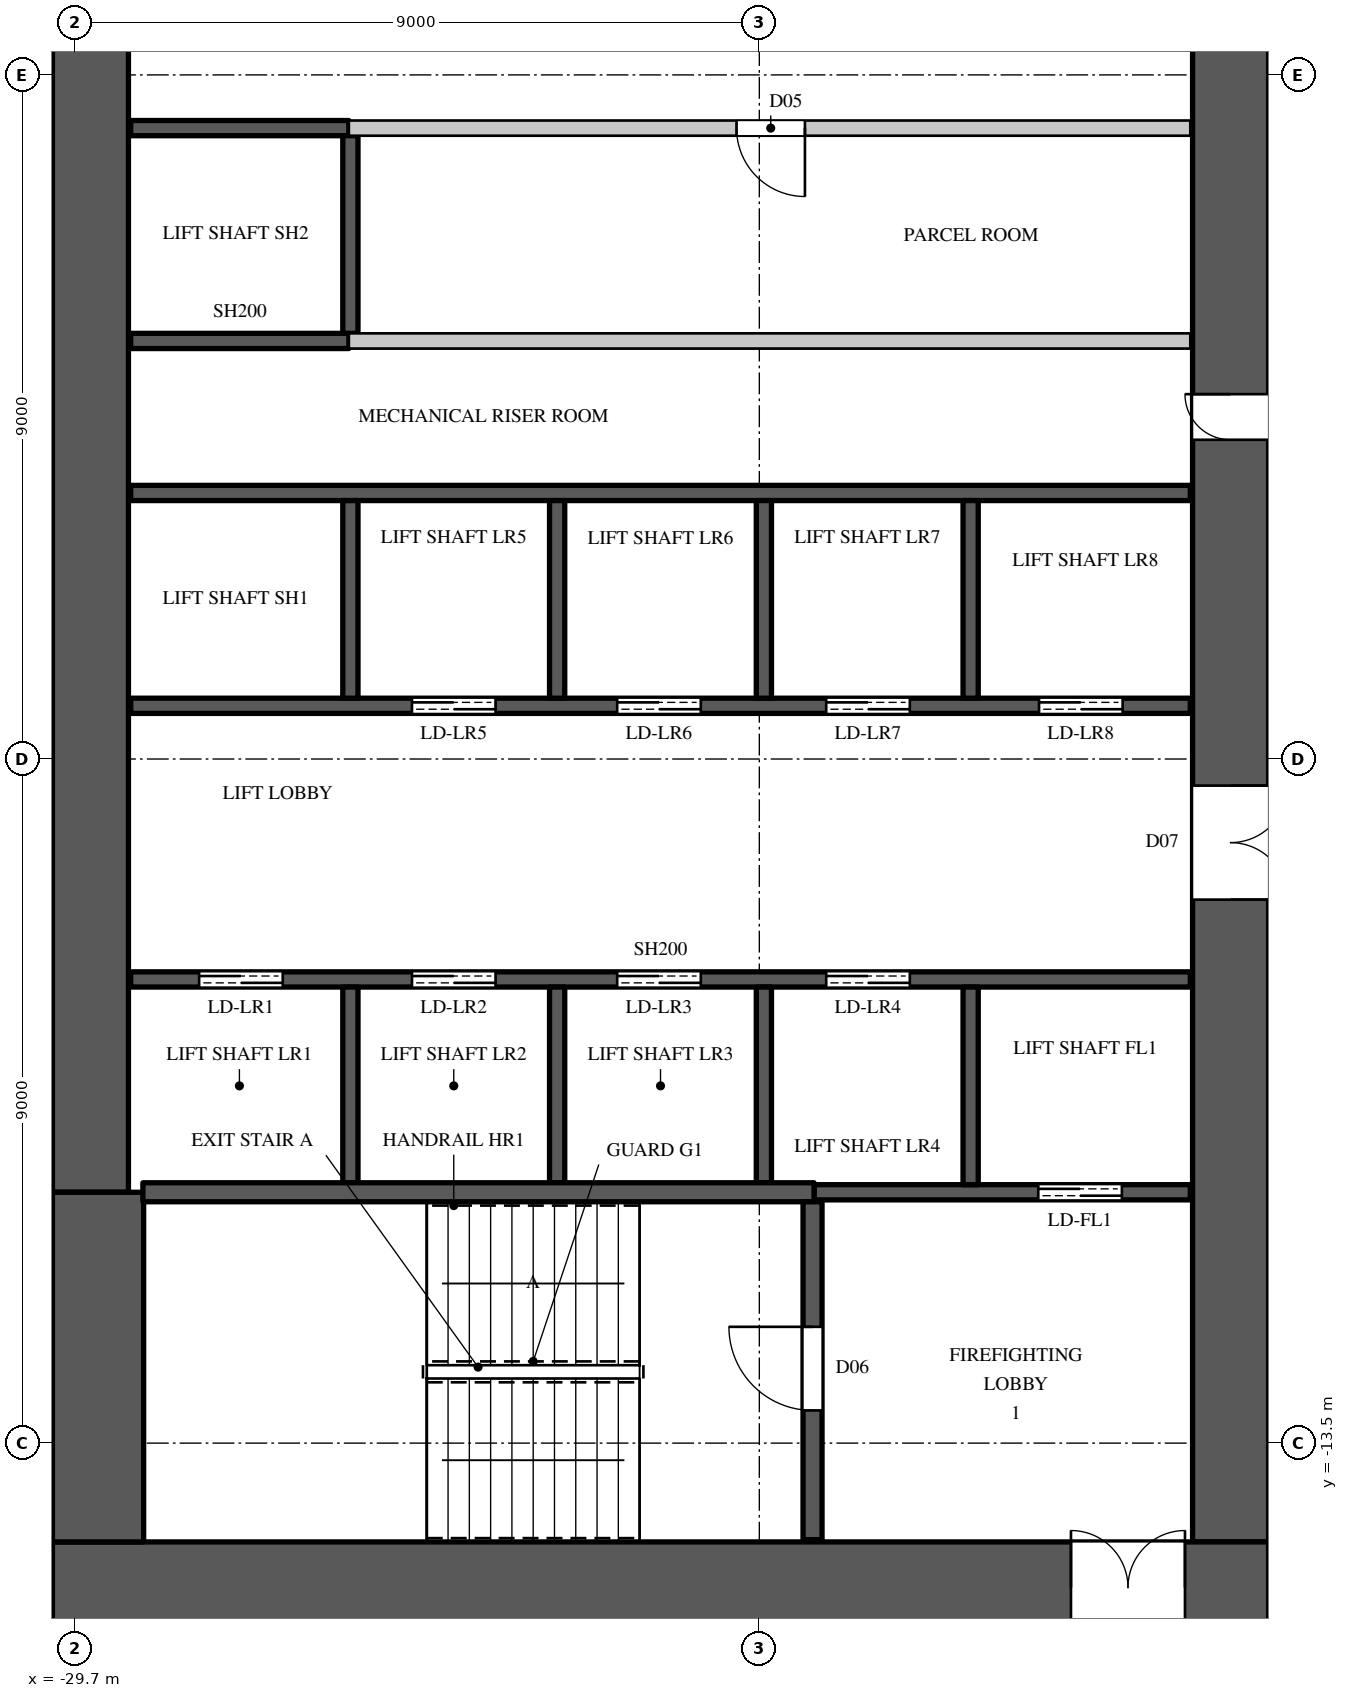
"""IFC4 building model, lengths in metres.
Left out: names, types, materials, properties, quantities, classifications, styles, units other than length and angle.
Written with IfcOpenShell. Run it as: python <this file> out.ifc"""

import sys

from ifc_helpers import new_model, si_unit, direction, frame, frame_2d, origin, place, context, subcontext, project, spatial, rectangle, extrude, element, fill, save


model = new_model("IFC4")
c1 = context("Model", 3, precision=1e-05, world=origin(), true_north=direction((0.0, 1.0)))
c2 = subcontext(c1, "Body", "Model", "MODEL_VIEW")
j1 = project(units=[si_unit("LENGTHUNIT", "METRE"), si_unit("PLANEANGLEUNIT", "RADIAN")], contexts=[c1])
p1 = place(None, origin())
s1 = spatial("IfcSite", under=j1, at=p1, CompositionType="ELEMENT")
p2 = place(p1, origin())
s2 = spatial("IfcBuilding", under=s1, at=p2, CompositionType="ELEMENT")
p3 = place(p2, frame((0.0, 0.0, 109.5)))
s3 = spatial("IfcBuildingStorey", under=s2, at=p3, CompositionType="ELEMENT", Elevation=109.5)
p4 = place(p3, frame((-30.0, -15.4, 0.0), z_axis=(0.0, 0.0, 1.0), x_axis=(1.0, 0.0, 0.0)))
e1 = element("IfcWall", 1, at=p4, inside=s3, PredefinedType="SHEAR", context=c2, shape_type="SweptSolid", body=[
    extrude(rectangle(XDim=16.0, YDim=1.2, at=frame_2d((8.0, 0.0))), origin(), (0.0, 0.0, 1.0), 3.6),
])
p5 = place(p4, frame((13.4, 0.0, 0.0)))
e2 = element("IfcOpeningElement", 2, at=p5, cuts=e1, PredefinedType="OPENING", context=c2, shape_type="SweptSolid", body=[
    extrude(rectangle(XDim=1.5, YDim=2.4, at=frame_2d((0.75, 1.2))), frame((0.0, 0.61, 0.0), z_axis=(0.0, -1.0, 0.0), x_axis=(1.0, 0.0, 0.0)), (0.0, 0.0, 1.0), 1.22),
])
p6 = place(p3, frame((-14.5, -14.8, 0.0), z_axis=(0.0, 0.0, 1.0), x_axis=(0.0, 1.0, 0.0)))
e3 = element("IfcWall", 3, at=p6, inside=s3, PredefinedType="SHEAR", context=c2, shape_type="SweptSolid", body=[
    extrude(rectangle(XDim=29.6, YDim=1.0, at=frame_2d((14.8, 0.0))), origin(), (0.0, 0.0, 1.0), 3.6),
])
p7 = place(p6, frame((8.45, 0.0, 0.0)))
e4 = element("IfcOpeningElement", 4, at=p7, cuts=e3, PredefinedType="OPENING", context=c2, shape_type="SweptSolid", body=[
    extrude(rectangle(XDim=1.5, YDim=2.4, at=frame_2d((0.75, 1.2))), frame((0.0, 0.51, 0.0), z_axis=(0.0, -1.0, 0.0), x_axis=(1.0, 0.0, 0.0)), (0.0, 0.0, 1.0), 1.02),
])
p8 = place(p6, frame((19.65, 0.0, 0.0)))
e5 = element("IfcOpeningElement", 5, at=p8, cuts=e3, PredefinedType="OPENING", context=c2, shape_type="SweptSolid", body=[
    extrude(rectangle(XDim=1.5, YDim=2.4, at=frame_2d((0.75, 1.2))), frame((0.0, 0.51, 0.0), z_axis=(0.0, -1.0, 0.0), x_axis=(1.0, 0.0, 0.0)), (0.0, 0.0, 1.0), 1.02),
])
p9 = place(p6, frame((14.5, 0.0, 0.0)))
e6 = element("IfcOpeningElement", 6, at=p9, cuts=e3, PredefinedType="OPENING", context=c2, shape_type="SweptSolid", body=[
    extrude(rectangle(XDim=0.6, YDim=2.0, at=frame_2d((0.3, 1.0))), frame((0.0, 0.51, 0.0), z_axis=(0.0, -1.0, 0.0), x_axis=(1.0, 0.0, 0.0)), (0.0, 0.0, 1.0), 1.02),
])
p10 = place(p3, frame((-29.5, -10.2, 0.0), z_axis=(0.0, 0.0, 1.0), x_axis=(0.0, 1.0, 0.0)))
e7 = element("IfcWall", 7, at=p10, inside=s3, PredefinedType="SHEAR", context=c2, shape_type="SweptSolid", body=[
    extrude(rectangle(XDim=20.4, YDim=1.0, at=frame_2d((10.2, 0.0))), origin(), (0.0, 0.0, 1.0), 3.6),
])
p11 = place(p3, frame((-29.4, -14.8, 0.0), z_axis=(0.0, 0.0, 1.0), x_axis=(0.0, 1.0, 0.0)))
e8 = element("IfcWall", 8, at=p11, inside=s3, PredefinedType="SHEAR", context=c2, shape_type="SweptSolid", body=[
    extrude(rectangle(XDim=4.6, YDim=1.2, at=frame_2d((2.3, 0.0))), origin(), (0.0, 0.0, 1.0), 3.6),
])
p12 = place(p3, frame((-26.1, 3.8, 0.0), z_axis=(0.0, 0.0, 1.0), x_axis=(1.0, 0.0, 0.0)))
e9 = element("IfcWall", 9, at=p12, inside=s3, PredefinedType="PARTITIONING", context=c2, shape_type="SweptSolid", body=[
    extrude(rectangle(XDim=11.07, YDim=0.2, at=frame_2d((5.535, 0.0))), origin(), (0.0, 0.0, 1.0), 3.3),
])
p13 = place(p12, frame((5.1, 0.0, 0.0)))
e10 = element("IfcOpeningElement", 10, at=p13, cuts=e9, PredefinedType="OPENING", context=c2, shape_type="SweptSolid", body=[
    extrude(rectangle(XDim=0.9, YDim=2.2, at=frame_2d((0.45, 1.1))), frame((0.0, 0.11, 0.0), z_axis=(0.0, -1.0, 0.0), x_axis=(1.0, 0.0, 0.0)), (0.0, 0.0, 1.0), 0.22),
])
p14 = place(p3, frame((-26.1, 1.0, 0.0), z_axis=(0.0, 0.0, 1.0), x_axis=(1.0, 0.0, 0.0)))
e11 = element("IfcWall", 11, at=p14, inside=s3, PredefinedType="PARTITIONING", context=c2, shape_type="SweptSolid", body=[
    extrude(rectangle(XDim=11.07, YDim=0.2, at=frame_2d((5.535, 0.0))), origin(), (0.0, 0.0, 1.0), 3.3),
])
p15 = place(p3, frame((-28.97, -7.4, 0.0), z_axis=(0.0, 0.0, 1.0), x_axis=(1.0, 0.0, 0.0)))
e12 = element("IfcWall", 12, at=p15, inside=s3, PredefinedType="SHEAR", context=c2, shape_type="SweptSolid", body=[
    extrude(rectangle(XDim=13.94, YDim=0.2, at=frame_2d((6.97, 0.0))), origin(), (0.0, 0.0, 1.0), 3.3),
])
p16 = place(p15, frame((0.9, 0.0, 0.0)))
e13 = element("IfcOpeningElement", 13, at=p16, cuts=e12, PredefinedType="OPENING", context=c2, shape_type="SweptSolid", body=[
    extrude(rectangle(XDim=1.1, YDim=2.2, at=frame_2d((0.55, 1.1))), frame((0.0, 0.11, 0.0), z_axis=(0.0, -1.0, 0.0), x_axis=(1.0, 0.0, 0.0)), (0.0, 0.0, 1.0), 0.22),
])
p17 = place(p15, frame((3.7, 0.0, 0.0)))
e14 = element("IfcOpeningElement", 14, at=p17, cuts=e12, PredefinedType="OPENING", context=c2, shape_type="SweptSolid", body=[
    extrude(rectangle(XDim=1.1, YDim=2.2, at=frame_2d((0.55, 1.1))), frame((0.0, 0.11, 0.0), z_axis=(0.0, -1.0, 0.0), x_axis=(1.0, 0.0, 0.0)), (0.0, 0.0, 1.0), 0.22),
])
p18 = place(p15, frame((6.4, 0.0, 0.0)))
e15 = element("IfcOpeningElement", 15, at=p18, cuts=e12, PredefinedType="OPENING", context=c2, shape_type="SweptSolid", body=[
    extrude(rectangle(XDim=1.1, YDim=2.2, at=frame_2d((0.55, 1.1))), frame((0.0, 0.11, 0.0), z_axis=(0.0, -1.0, 0.0), x_axis=(1.0, 0.0, 0.0)), (0.0, 0.0, 1.0), 0.22),
])
p19 = place(p15, frame((9.15, 0.0, 0.0)))
e16 = element("IfcOpeningElement", 16, at=p19, cuts=e12, PredefinedType="OPENING", context=c2, shape_type="SweptSolid", body=[
    extrude(rectangle(XDim=1.1, YDim=2.2, at=frame_2d((0.55, 1.1))), frame((0.0, 0.11, 0.0), z_axis=(0.0, -1.0, 0.0), x_axis=(1.0, 0.0, 0.0)), (0.0, 0.0, 1.0), 0.22),
])
p20 = place(p3, frame((-28.97, -3.8, 0.0), z_axis=(0.0, 0.0, 1.0), x_axis=(1.0, 0.0, 0.0)))
e17 = element("IfcWall", 17, at=p20, inside=s3, PredefinedType="SHEAR", context=c2, shape_type="SweptSolid", body=[
    extrude(rectangle(XDim=13.94, YDim=0.2, at=frame_2d((6.97, 0.0))), origin(), (0.0, 0.0, 1.0), 3.3),
])
p21 = place(p20, frame((3.7, 0.0, 0.0)))
e18 = element("IfcOpeningElement", 18, at=p21, cuts=e17, PredefinedType="OPENING", context=c2, shape_type="SweptSolid", body=[
    extrude(rectangle(XDim=1.1, YDim=2.2, at=frame_2d((0.55, 1.1))), frame((0.0, 0.11, 0.0), z_axis=(0.0, -1.0, 0.0), x_axis=(1.0, 0.0, 0.0)), (0.0, 0.0, 1.0), 0.22),
])
p22 = place(p20, frame((6.4, 0.0, 0.0)))
e19 = element("IfcOpeningElement", 19, at=p22, cuts=e17, PredefinedType="OPENING", context=c2, shape_type="SweptSolid", body=[
    extrude(rectangle(XDim=1.1, YDim=2.2, at=frame_2d((0.55, 1.1))), frame((0.0, 0.11, 0.0), z_axis=(0.0, -1.0, 0.0), x_axis=(1.0, 0.0, 0.0)), (0.0, 0.0, 1.0), 0.22),
])
p23 = place(p20, frame((9.15, 0.0, 0.0)))
e20 = element("IfcOpeningElement", 20, at=p23, cuts=e17, PredefinedType="OPENING", context=c2, shape_type="SweptSolid", body=[
    extrude(rectangle(XDim=1.1, YDim=2.2, at=frame_2d((0.55, 1.1))), frame((0.0, 0.11, 0.0), z_axis=(0.0, -1.0, 0.0), x_axis=(1.0, 0.0, 0.0)), (0.0, 0.0, 1.0), 0.22),
])
p24 = place(p20, frame((11.95, 0.0, 0.0)))
e21 = element("IfcOpeningElement", 21, at=p24, cuts=e17, PredefinedType="OPENING", context=c2, shape_type="SweptSolid", body=[
    extrude(rectangle(XDim=1.1, YDim=2.2, at=frame_2d((0.55, 1.1))), frame((0.0, 0.11, 0.0), z_axis=(0.0, -1.0, 0.0), x_axis=(1.0, 0.0, 0.0)), (0.0, 0.0, 1.0), 0.22),
])
p25 = place(p3, frame((-28.97, -1.0, 0.0), z_axis=(0.0, 0.0, 1.0), x_axis=(1.0, 0.0, 0.0)))
e22 = element("IfcWall", 22, at=p25, inside=s3, PredefinedType="SHEAR", context=c2, shape_type="SweptSolid", body=[
    extrude(rectangle(XDim=13.94, YDim=0.2, at=frame_2d((6.97, 0.0))), origin(), (0.0, 0.0, 1.0), 3.3),
])
for number, where, z_axis, x_axis in (
    (23, (-28.97, 1.0, 0.0), (0.0, 0.0, 1.0), (1.0, 0.0, 0.0)),
    (24, (-28.97, 3.8, 0.0), (0.0, 0.0, 1.0), (1.0, 0.0, 0.0)),
):
    element("IfcWall", number, at=place(p3, frame(where, z_axis=z_axis, x_axis=x_axis)), inside=s3, PredefinedType="SHEAR", context=c2, shape_type="SweptSolid", body=[
        extrude(rectangle(XDim=2.87, YDim=0.2, at=frame_2d((1.435, 0.0))), origin(), (0.0, 0.0, 1.0), 3.3),
    ])
p26 = place(p3, frame((-26.08, -10.075, 0.0), z_axis=(0.0, 0.0, 1.0), x_axis=(0.0, 1.0, 0.0)))
e25 = element("IfcWall", 25, at=p26, inside=s3, PredefinedType="SHEAR", context=c2, shape_type="SweptSolid", body=[
    extrude(rectangle(XDim=2.575, YDim=0.2, at=frame_2d((1.288, 0.0))), origin(), (0.0, 0.0, 1.0), 3.6),
])
p27 = place(p3, frame((-26.08, -3.7, 0.0), z_axis=(0.0, 0.0, 1.0), x_axis=(0.0, 1.0, 0.0)))
e26 = element("IfcWall", 26, at=p27, inside=s3, PredefinedType="SHEAR", context=c2, shape_type="SweptSolid", body=[
    extrude(rectangle(XDim=2.6, YDim=0.2, at=frame_2d((1.3, 0.0))), origin(), (0.0, 0.0, 1.0), 3.6),
])
p28 = place(p3, frame((-26.08, 1.1, 0.0), z_axis=(0.0, 0.0, 1.0), x_axis=(0.0, 1.0, 0.0)))
e27 = element("IfcWall", 27, at=p28, inside=s3, PredefinedType="SHEAR", context=c2, shape_type="SweptSolid", body=[
    extrude(rectangle(XDim=2.6, YDim=0.2, at=frame_2d((1.3, 0.0))), origin(), (0.0, 0.0, 1.0), 3.3),
])
p29 = place(p3, frame((-23.36, -10.075, 0.0), z_axis=(0.0, 0.0, 1.0), x_axis=(0.0, 1.0, 0.0)))
e28 = element("IfcWall", 28, at=p29, inside=s3, PredefinedType="SHEAR", context=c2, shape_type="SweptSolid", body=[
    extrude(rectangle(XDim=2.575, YDim=0.2, at=frame_2d((1.288, 0.0))), origin(), (0.0, 0.0, 1.0), 3.6),
])
p30 = place(p3, frame((-23.36, -3.7, 0.0), z_axis=(0.0, 0.0, 1.0), x_axis=(0.0, 1.0, 0.0)))
e29 = element("IfcWall", 29, at=p30, inside=s3, PredefinedType="SHEAR", context=c2, shape_type="SweptSolid", body=[
    extrude(rectangle(XDim=2.6, YDim=0.2, at=frame_2d((1.3, 0.0))), origin(), (0.0, 0.0, 1.0), 3.6),
])
p31 = place(p3, frame((-20.64, -10.075, 0.0), z_axis=(0.0, 0.0, 1.0), x_axis=(0.0, 1.0, 0.0)))
e30 = element("IfcWall", 30, at=p31, inside=s3, PredefinedType="SHEAR", context=c2, shape_type="SweptSolid", body=[
    extrude(rectangle(XDim=2.575, YDim=0.2, at=frame_2d((1.288, 0.0))), origin(), (0.0, 0.0, 1.0), 3.6),
])
p32 = place(p3, frame((-20.64, -3.7, 0.0), z_axis=(0.0, 0.0, 1.0), x_axis=(0.0, 1.0, 0.0)))
e31 = element("IfcWall", 31, at=p32, inside=s3, PredefinedType="SHEAR", context=c2, shape_type="SweptSolid", body=[
    extrude(rectangle(XDim=2.6, YDim=0.2, at=frame_2d((1.3, 0.0))), origin(), (0.0, 0.0, 1.0), 3.6),
])
p33 = place(p3, frame((-19.98, -10.2, 0.0), z_axis=(0.0, 0.0, 1.0), x_axis=(1.0, 0.0, 0.0)))
e32 = element("IfcWall", 32, at=p33, inside=s3, PredefinedType="SHEAR", context=c2, shape_type="SweptSolid", body=[
    extrude(rectangle(XDim=4.95, YDim=0.2, at=frame_2d((2.475, 0.0))), origin(), (0.0, 0.0, 1.0), 3.3),
])
p34 = place(p33, frame((2.95, 0.0, 0.0)))
e33 = element("IfcOpeningElement", 33, at=p34, cuts=e32, PredefinedType="OPENING", context=c2, shape_type="SweptSolid", body=[
    extrude(rectangle(XDim=1.1, YDim=2.2, at=frame_2d((0.55, 1.1))), frame((0.0, 0.11, 0.0), z_axis=(0.0, -1.0, 0.0), x_axis=(1.0, 0.0, 0.0)), (0.0, 0.0, 1.0), 0.22),
])
p35 = place(p3, frame((-17.92, -10.1, 0.0), z_axis=(0.0, 0.0, 1.0), x_axis=(0.0, 1.0, 0.0)))
e34 = element("IfcWall", 34, at=p35, inside=s3, PredefinedType="SHEAR", context=c2, shape_type="SweptSolid", body=[
    extrude(rectangle(XDim=2.6, YDim=0.2, at=frame_2d((1.3, 0.0))), origin(), (0.0, 0.0, 1.0), 3.6),
])
p36 = place(p3, frame((-17.92, -3.7, 0.0), z_axis=(0.0, 0.0, 1.0), x_axis=(0.0, 1.0, 0.0)))
e35 = element("IfcWall", 35, at=p36, inside=s3, PredefinedType="SHEAR", context=c2, shape_type="SweptSolid", body=[
    extrude(rectangle(XDim=2.6, YDim=0.2, at=frame_2d((1.3, 0.0))), origin(), (0.0, 0.0, 1.0), 3.6),
])
p37 = place(p3, frame((-28.81, -10.2, 0.0), z_axis=(0.0, 0.0, 1.0), x_axis=(1.0, 0.0, 0.0)))
e36 = element("IfcWall", 36, at=p37, inside=s3, PredefinedType="SHEAR", context=c2, shape_type="SweptSolid", body=[
    extrude(rectangle(XDim=8.83, YDim=0.25, at=frame_2d((4.415, 0.0))), origin(), (0.0, 0.0, 1.0), 3.3),
])
p38 = place(p3, frame((-20.0, -14.77, 0.0), z_axis=(0.0, 0.0, 1.0), x_axis=(0.0, 1.0, 0.0)))
e37 = element("IfcWall", 37, at=p38, inside=s3, PredefinedType="SHEAR", context=c2, shape_type="SweptSolid", body=[
    extrude(rectangle(XDim=4.445, YDim=0.25, at=frame_2d((2.223, 0.0))), origin(), (0.0, 0.0, 1.0), 3.3),
])
p39 = place(p38, frame((1.7, 0.0, 0.0)))
e38 = element("IfcOpeningElement", 38, at=p39, cuts=e37, PredefinedType="OPENING", context=c2, shape_type="SweptSolid", body=[
    extrude(rectangle(XDim=1.1, YDim=2.2, at=frame_2d((0.55, 1.1))), frame((0.0, 0.135, 0.0), z_axis=(0.0, -1.0, 0.0), x_axis=(1.0, 0.0, 0.0)), (0.0, 0.0, 1.0), 0.27),
])
p40 = place(p39, origin())
e39 = element("IfcDoor", 39, at=p40, inside=s3, OperationType="SINGLE_SWING_RIGHT", PredefinedType="DOOR", context=c2, shape_type="SweptSolid", body=[
    extrude(rectangle(XDim=1.1, YDim=2.2, at=frame_2d((0.55, 1.1))), frame((0.0, 0.025, 0.0), z_axis=(0.0, -1.0, 0.0), x_axis=(1.0, 0.0, 0.0)), (0.0, 0.0, 1.0), 0.05),
])
fill(e38, e39)
p41 = place(p13, origin())
e40 = element("IfcDoor", 40, at=p41, inside=s3, OperationType="SINGLE_SWING_LEFT", PredefinedType="DOOR", context=c2, shape_type="SweptSolid", body=[
    extrude(rectangle(XDim=0.9, YDim=2.2, at=frame_2d((0.45, 1.1))), frame((0.0, 0.025, 0.0), z_axis=(0.0, -1.0, 0.0), x_axis=(1.0, 0.0, 0.0)), (0.0, 0.0, 1.0), 0.05),
])
fill(e10, e40)
p42 = place(p16, origin())
e41 = element("IfcDoor", 41, at=p42, inside=s3, OperationType="DOUBLE_DOOR_SLIDING", PredefinedType="DOOR", context=c2, shape_type="SweptSolid", body=[
    extrude(rectangle(XDim=1.1, YDim=2.2, at=frame_2d((0.55, 1.1))), frame((0.0, 0.025, 0.0), z_axis=(0.0, -1.0, 0.0), x_axis=(1.0, 0.0, 0.0)), (0.0, 0.0, 1.0), 0.05),
])
fill(e13, e41)
p43 = place(p17, origin())
e42 = element("IfcDoor", 42, at=p43, inside=s3, OperationType="DOUBLE_DOOR_SLIDING", PredefinedType="DOOR", context=c2, shape_type="SweptSolid", body=[
    extrude(rectangle(XDim=1.1, YDim=2.2, at=frame_2d((0.55, 1.1))), frame((0.0, 0.025, 0.0), z_axis=(0.0, -1.0, 0.0), x_axis=(1.0, 0.0, 0.0)), (0.0, 0.0, 1.0), 0.05),
])
fill(e14, e42)
p44 = place(p18, origin())
e43 = element("IfcDoor", 43, at=p44, inside=s3, OperationType="DOUBLE_DOOR_SLIDING", PredefinedType="DOOR", context=c2, shape_type="SweptSolid", body=[
    extrude(rectangle(XDim=1.1, YDim=2.2, at=frame_2d((0.55, 1.1))), frame((0.0, 0.025, 0.0), z_axis=(0.0, -1.0, 0.0), x_axis=(1.0, 0.0, 0.0)), (0.0, 0.0, 1.0), 0.05),
])
fill(e15, e43)
p45 = place(p19, origin())
e44 = element("IfcDoor", 44, at=p45, inside=s3, OperationType="DOUBLE_DOOR_SLIDING", PredefinedType="DOOR", context=c2, shape_type="SweptSolid", body=[
    extrude(rectangle(XDim=1.1, YDim=2.2, at=frame_2d((0.55, 1.1))), frame((0.0, 0.025, 0.0), z_axis=(0.0, -1.0, 0.0), x_axis=(1.0, 0.0, 0.0)), (0.0, 0.0, 1.0), 0.05),
])
fill(e16, e44)
p46 = place(p34, origin())
e45 = element("IfcDoor", 45, at=p46, inside=s3, OperationType="DOUBLE_DOOR_SLIDING", PredefinedType="DOOR", context=c2, shape_type="SweptSolid", body=[
    extrude(rectangle(XDim=1.1, YDim=2.2, at=frame_2d((0.55, 1.1))), frame((0.0, 0.025, 0.0), z_axis=(0.0, -1.0, 0.0), x_axis=(1.0, 0.0, 0.0)), (0.0, 0.0, 1.0), 0.05),
])
fill(e33, e45)
p47 = place(p21, origin())
e46 = element("IfcDoor", 46, at=p47, inside=s3, OperationType="DOUBLE_DOOR_SLIDING", PredefinedType="DOOR", context=c2, shape_type="SweptSolid", body=[
    extrude(rectangle(XDim=1.1, YDim=2.2, at=frame_2d((0.55, 1.1))), frame((0.0, 0.025, 0.0), z_axis=(0.0, -1.0, 0.0), x_axis=(1.0, 0.0, 0.0)), (0.0, 0.0, 1.0), 0.05),
])
fill(e18, e46)
p48 = place(p22, origin())
e47 = element("IfcDoor", 47, at=p48, inside=s3, OperationType="DOUBLE_DOOR_SLIDING", PredefinedType="DOOR", context=c2, shape_type="SweptSolid", body=[
    extrude(rectangle(XDim=1.1, YDim=2.2, at=frame_2d((0.55, 1.1))), frame((0.0, 0.025, 0.0), z_axis=(0.0, -1.0, 0.0), x_axis=(1.0, 0.0, 0.0)), (0.0, 0.0, 1.0), 0.05),
])
fill(e19, e47)
p49 = place(p23, origin())
e48 = element("IfcDoor", 48, at=p49, inside=s3, OperationType="DOUBLE_DOOR_SLIDING", PredefinedType="DOOR", context=c2, shape_type="SweptSolid", body=[
    extrude(rectangle(XDim=1.1, YDim=2.2, at=frame_2d((0.55, 1.1))), frame((0.0, 0.025, 0.0), z_axis=(0.0, -1.0, 0.0), x_axis=(1.0, 0.0, 0.0)), (0.0, 0.0, 1.0), 0.05),
])
fill(e20, e48)
p50 = place(p24, origin())
e49 = element("IfcDoor", 49, at=p50, inside=s3, OperationType="DOUBLE_DOOR_SLIDING", PredefinedType="DOOR", context=c2, shape_type="SweptSolid", body=[
    extrude(rectangle(XDim=1.1, YDim=2.2, at=frame_2d((0.55, 1.1))), frame((0.0, 0.025, 0.0), z_axis=(0.0, -1.0, 0.0), x_axis=(1.0, 0.0, 0.0)), (0.0, 0.0, 1.0), 0.05),
])
fill(e21, e49)
p51 = place(p5, origin())
e50 = element("IfcDoor", 50, at=p51, inside=s3, OperationType="DOUBLE_DOOR_SINGLE_SWING", PredefinedType="DOOR", context=c2, shape_type="SweptSolid", body=[
    extrude(rectangle(XDim=1.5, YDim=2.4, at=frame_2d((0.75, 1.2))), frame((0.0, 0.025, 0.0), z_axis=(0.0, -1.0, 0.0), x_axis=(1.0, 0.0, 0.0)), (0.0, 0.0, 1.0), 0.05),
])
fill(e2, e50)
p52 = place(p7, origin())
e51 = element("IfcDoor", 51, at=p52, inside=s3, OperationType="DOUBLE_DOOR_SINGLE_SWING", PredefinedType="DOOR", context=c2, shape_type="SweptSolid", body=[
    extrude(rectangle(XDim=1.5, YDim=2.4, at=frame_2d((0.75, 1.2))), frame((0.0, -0.445, 0.0), z_axis=(0.0, -1.0, 0.0), x_axis=(1.0, 0.0, 0.0)), (0.0, 0.0, 1.0), 0.05),
])
fill(e4, e51)
p53 = place(p9, origin())
e52 = element("IfcDoor", 52, at=p53, inside=s3, OperationType="SINGLE_SWING_RIGHT", PredefinedType="DOOR", context=c2, shape_type="SweptSolid", body=[
    extrude(rectangle(XDim=0.6, YDim=2.0, at=frame_2d((0.3, 1.0))), frame((0.0, 0.495, 0.0), z_axis=(0.0, -1.0, 0.0), x_axis=(1.0, 0.0, 0.0)), (0.0, 0.0, 1.0), 0.05),
])
fill(e6, e52)
save(model, sys.argv[1])
